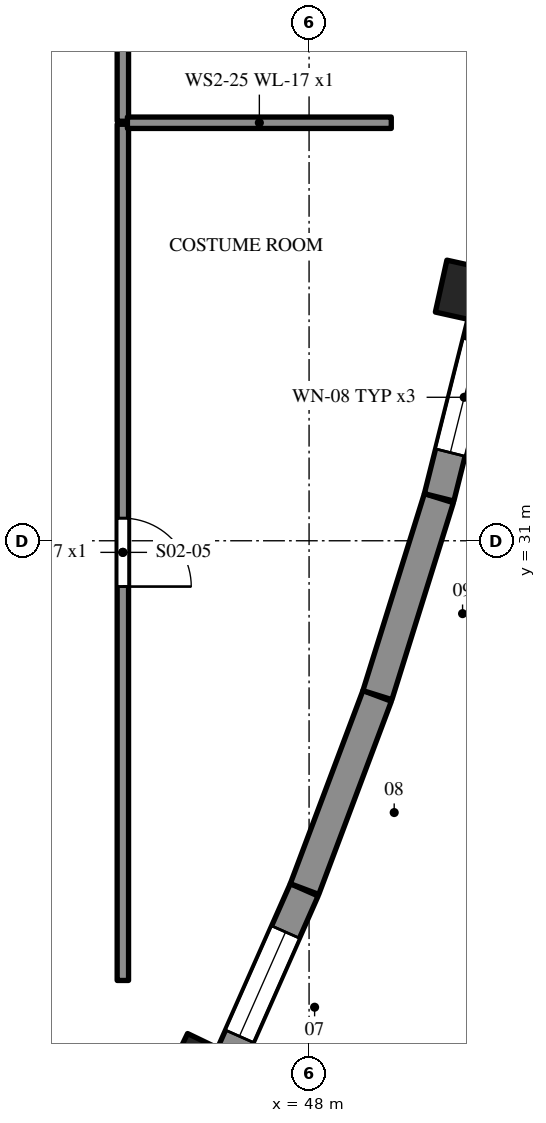
"""IFC4 building model, lengths in metres.
Left out: names, types, materials, properties, quantities, classifications, styles, units other than length and angle.
Written with IfcOpenShell. Run it as: python <this file> out.ifc"""

import sys

from ifc_helpers import new_model, si_unit, direction, frame, frame_2d, origin, origin_2d, place, context, subcontext, project, spatial, polyline, rectangle, outline, extrude, element, fill, save


model = new_model("IFC4")
c1 = context("Model", 3, precision=1e-05, world=origin(), true_north=direction((0.0, 1.0)))
c2 = subcontext(c1, "Body", "Model", "MODEL_VIEW")
j1 = project(units=[si_unit("LENGTHUNIT", "METRE"), si_unit("PLANEANGLEUNIT", "RADIAN")], contexts=[c1])
p1 = place(None, origin())
s1 = spatial("IfcSite", under=j1, at=p1, CompositionType="ELEMENT")
p2 = place(p1, origin())
s2 = spatial("IfcBuilding", under=s1, at=p2, CompositionType="ELEMENT")
p3 = place(p2, frame((0.0, 0.0, 10.2)))
s3 = spatial("IfcBuildingStorey", under=s2, at=p3, CompositionType="ELEMENT", Elevation=10.2)
p4 = place(p3, frame((46.838, 23.925, 0.0), z_axis=(0.0, 0.0, 1.0), x_axis=(0.404652153757, 0.914470685402, 0.0)))
e1 = element("IfcWall", 1, at=p4, inside=s3, PredefinedType="SOLIDWALL", context=c2, shape_type="SweptSolid", body=[
    extrude(outline(polyline([(0.0, 0.0), (2.714, 0.0), (2.714, 2.955), (2.576, 3.0), (0.194, 3.787), (0.105, 3.816), (0.0, 3.763), (0.0, 0.0)])), frame((0.0, 0.2, 0.0), z_axis=(0.0, -1.0, 0.0), x_axis=(1.0, 0.0, 0.0)), (0.0, 0.0, 1.0), 0.4),
])
p5 = place(p4, frame((0.607, 0.0, 0.9)))
e2 = element("IfcOpeningElement", 2, at=p5, cuts=e1, PredefinedType="OPENING", context=c2, shape_type="SweptSolid", body=[
    extrude(rectangle(XDim=1.5, YDim=1.5, at=frame_2d((0.75, 0.75))), frame((0.0, 0.21, 0.0), z_axis=(0.0, -1.0, 0.0), x_axis=(1.0, 0.0, 0.0)), (0.0, 0.0, 1.0), 0.42),
])
p6 = place(p3, frame((47.94, 26.417, 0.0), z_axis=(0.0, 0.0, 1.0), x_axis=(0.351862601417, 0.936051659752, 0.0)))
e3 = element("IfcWall", 3, at=p6, inside=s3, PredefinedType="SOLIDWALL", context=c2, shape_type="SweptSolid", body=[
    extrude(outline(polyline([(0.0, 0.0), (2.714, 0.0), (2.714, 2.055), (2.54, 2.113), (0.121, 2.912), (0.0, 2.948), (0.0, 0.0)])), frame((0.0, 0.2, 0.0), z_axis=(0.0, -1.0, 0.0), x_axis=(1.0, 0.0, 0.0)), (0.0, 0.0, 1.0), 0.4),
])
p7 = place(p3, frame((48.899, 28.969, 0.0), z_axis=(0.0, 0.0, 1.0), x_axis=(0.29795748067, 0.954579142718, 0.0)))
e4 = element("IfcWall", 4, at=p7, inside=s3, PredefinedType="SOLIDWALL", context=c2, shape_type="SweptSolid", body=[
    extrude(outline(polyline([(0.0, 0.0), (2.715, 0.0), (2.714, 2.93), (2.698, 2.924), (0.0, 2.052), (0.0, 0.0)])), frame((0.0, 0.2, 0.0), z_axis=(0.0, -1.0, 0.0), x_axis=(1.0, 0.0, 0.0)), (0.0, 0.0, 1.0), 0.4),
])
p8 = place(p3, frame((49.711, 31.571, 0.0), z_axis=(0.0, 0.0, 1.0), x_axis=(0.2430011368, 0.970026003525, 0.0)))
e5 = element("IfcWall", 5, at=p8, inside=s3, PredefinedType="SOLIDWALL", context=c2, shape_type="SweptSolid", body=[
    extrude(outline(polyline([(0.0, 0.0), (2.715, 0.0), (2.715, 3.836), (2.687, 3.827), (2.637, 3.811), (2.587, 3.794), (0.0, 2.938), (0.0, 0.0)])), frame((0.0, 0.2, 0.0), z_axis=(0.0, -1.0, 0.0), x_axis=(1.0, 0.0, 0.0)), (0.0, 0.0, 1.0), 0.4),
])
p9 = place(p8, frame((0.607, 0.0, 0.9)))
e6 = element("IfcOpeningElement", 6, at=p9, cuts=e5, PredefinedType="OPENING", context=c2, shape_type="SweptSolid", body=[
    extrude(rectangle(XDim=1.5, YDim=1.5, at=frame_2d((0.75, 0.75))), frame((0.0, 0.21, 0.0), z_axis=(0.0, -1.0, 0.0), x_axis=(1.0, 0.0, 0.0)), (0.0, 0.0, 1.0), 0.42),
])
p10 = place(p3, frame((46.452, 24.104, 0.0), z_axis=(0.0, 0.0, 1.0), x_axis=(0.433813735983, 0.901002576285, 0.0)))
e7 = element("IfcColumn", 7, at=p10, inside=s3, PredefinedType="PILASTER", context=c2, shape_type="SweptSolid", body=[
    extrude(rectangle(XDim=0.7, YDim=0.45, at=origin_2d()), origin(), (0.0, 0.0, 1.0), 3.929),
])
p11 = place(p3, frame((49.957, 34.302, 0.0), z_axis=(0.0, 0.0, 1.0), x_axis=(0.216640755448, 0.976251393381, 0.0)))
e8 = element("IfcColumn", 8, at=p11, inside=s3, PredefinedType="PILASTER", context=c2, shape_type="SweptSolid", body=[
    extrude(rectangle(XDim=0.7, YDim=0.45, at=origin_2d()), origin(), (0.0, 0.0, 1.0), 3.958),
])
p12 = place(p3, frame((45.55, 36.48, 0.0), z_axis=(0.0, 0.0, 1.0), x_axis=(0.0, -1.0, 0.0)))
e9 = element("IfcWall", 9, at=p12, inside=s3, PredefinedType="PARTITIONING", context=c2, shape_type="SweptSolid", body=[
    extrude(rectangle(XDim=11.265, YDim=0.15, at=frame_2d((5.633, 0.0))), origin(), (0.0, 0.0, 1.0), 2.4),
])
p13 = place(p12, frame((5.183, 0.0, 0.0)))
e10 = element("IfcOpeningElement", 10, at=p13, cuts=e9, PredefinedType="OPENING", context=c2, shape_type="SweptSolid", body=[
    extrude(rectangle(XDim=0.9, YDim=2.1, at=frame_2d((0.45, 1.05))), frame((0.0, 0.085, 0.0), z_axis=(0.0, -1.0, 0.0), x_axis=(1.0, 0.0, 0.0)), (0.0, 0.0, 1.0), 0.17),
])
p14 = place(p3, frame((45.55, 42.98, 0.0), z_axis=(0.0, 0.0, 1.0), x_axis=(0.0, -1.0, 0.0)))
e11 = element("IfcWall", 11, at=p14, inside=s3, PredefinedType="PARTITIONING", context=c2, shape_type="SweptSolid", body=[
    extrude(rectangle(XDim=6.46, YDim=0.15, at=frame_2d((3.23, 0.0))), origin(), (0.0, 0.0, 1.0), 2.4),
])
p15 = place(p14, frame((2.78, 0.0, 0.0)))
e12 = element("IfcOpeningElement", 12, at=p15, cuts=e11, PredefinedType="OPENING", context=c2, shape_type="SweptSolid", body=[
    extrude(rectangle(XDim=0.9, YDim=2.1, at=frame_2d((0.45, 1.05))), frame((0.0, 0.085, 0.0), z_axis=(0.0, -1.0, 0.0), x_axis=(1.0, 0.0, 0.0)), (0.0, 0.0, 1.0), 0.17),
])
p16 = place(p3, frame((45.61, 36.5, 0.0), z_axis=(0.0, 0.0, 1.0), x_axis=(1.0, 0.0, 0.0)))
e13 = element("IfcWall", 13, at=p16, inside=s3, PredefinedType="PARTITIONING", context=c2, shape_type="SweptSolid", body=[
    extrude(rectangle(XDim=3.471, YDim=0.15, at=frame_2d((1.736, 0.0))), origin(), (0.0, 0.0, 1.0), 2.4),
])
p17 = place(p5, origin())
e14 = element("IfcWindow", 14, at=p17, inside=s3, PartitioningType="SINGLE_PANEL", PredefinedType="WINDOW", context=c2, shape_type="SweptSolid", body=[
    extrude(rectangle(XDim=1.5, YDim=1.5, at=frame_2d((0.75, 0.75))), frame((0.0, 0.03, 0.0), z_axis=(0.0, -1.0, 0.0), x_axis=(1.0, 0.0, 0.0)), (0.0, 0.0, 1.0), 0.06),
])
fill(e2, e14)
p18 = place(p9, origin())
e15 = element("IfcWindow", 15, at=p18, inside=s3, PartitioningType="SINGLE_PANEL", PredefinedType="WINDOW", context=c2, shape_type="SweptSolid", body=[
    extrude(rectangle(XDim=1.5, YDim=1.5, at=frame_2d((0.75, 0.75))), frame((0.0, 0.03, 0.0), z_axis=(0.0, -1.0, 0.0), x_axis=(1.0, 0.0, 0.0)), (0.0, 0.0, 1.0), 0.06),
])
fill(e6, e15)
p19 = place(p13, origin())
e16 = element("IfcDoor", 16, at=p19, inside=s3, OperationType="SINGLE_SWING_RIGHT", PredefinedType="DOOR", context=c2, shape_type="SweptSolid", body=[
    extrude(rectangle(XDim=0.9, YDim=2.1, at=frame_2d((0.45, 1.05))), frame((0.0, 0.025, 0.0), z_axis=(0.0, -1.0, 0.0), x_axis=(1.0, 0.0, 0.0)), (0.0, 0.0, 1.0), 0.05),
])
fill(e10, e16)
save(model, sys.argv[1])
